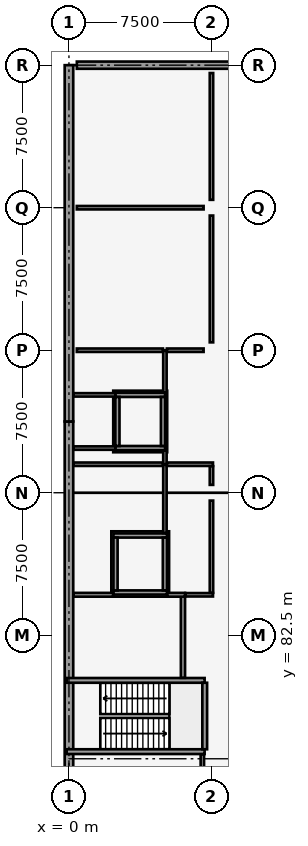
"""IFC4 building model, lengths in metres.
Left out: names, types, materials, properties, quantities, classifications, styles, units other than length and angle.
Written with IfcOpenShell. Run it as: python <this file> out.ifc"""

import sys

from ifc_helpers import new_model, si_unit, direction, frame, frame_2d, origin, origin_2d, place, context, subcontext, project, spatial, rectangle, extrude, element, fill, save


model = new_model("IFC4")
c1 = context("Model", 3, precision=1e-05, world=origin(), true_north=direction((0.0, 1.0)))
c2 = subcontext(c1, "Body", "Model", "MODEL_VIEW")
j1 = project(units=[si_unit("LENGTHUNIT", "METRE"), si_unit("PLANEANGLEUNIT", "RADIAN")], contexts=[c1])
p1 = place(None, origin())
s1 = spatial("IfcSite", under=j1, at=p1, CompositionType="ELEMENT")
p2 = place(p1, origin())
s2 = spatial("IfcBuilding", under=s1, at=p2, CompositionType="ELEMENT")
p3 = place(p2, frame((0.0, 0.0, -4.8)))
s3 = spatial("IfcBuildingStorey", under=s2, at=p3, CompositionType="ELEMENT", Elevation=-4.8)
for number, where, z_axis, x_axis in (
    (1, (0.0, 82.5, 0.0), (0.0, 0.0, 1.0), (1.0, 0.0, 0.0)),
    (2, (0.0, 90.0, 0.0), (0.0, 0.0, 1.0), (1.0, 0.0, 0.0)),
    (3, (0.0, 97.5, 0.0), (0.0, 0.0, 1.0), (1.0, 0.0, 0.0)),
    (4, (0.0, 105.0, 0.0), (0.0, 0.0, 1.0), (1.0, 0.0, 0.0)),
    (5, (0.0, 112.5, 0.0), (0.0, 0.0, 1.0), (1.0, 0.0, 0.0)),
    (6, (7.5, 82.5, 0.0), (0.0, 0.0, 1.0), (1.0, 0.0, 0.0)),
    (7, (7.5, 90.0, 0.0), (0.0, 0.0, 1.0), (1.0, 0.0, 0.0)),
    (8, (7.5, 97.5, 0.0), (0.0, 0.0, 1.0), (1.0, 0.0, 0.0)),
    (9, (7.5, 105.0, 0.0), (0.0, 0.0, 1.0), (1.0, 0.0, 0.0)),
    (10, (7.5, 112.5, 0.0), (0.0, 0.0, 1.0), (1.0, 0.0, 0.0)),
):
    element("IfcColumn", number, at=place(p3, frame(where, z_axis=z_axis, x_axis=x_axis)), inside=s3, PredefinedType="COLUMN", context=c2, shape_type="SweptSolid", body=[
        extrude(rectangle(XDim=0.8, YDim=0.8, at=origin_2d()), origin(), (0.0, 0.0, 1.0), 4.8),
    ])
p4 = place(p3, frame((0.0, 101.25, 0.0), z_axis=(0.0, 0.0, 1.0), x_axis=(1.0, 0.0, 0.0)))
e11 = element("IfcColumn", 11, at=p4, inside=s3, PredefinedType="PILASTER", context=c2, shape_type="SweptSolid", body=[
    extrude(rectangle(XDim=0.45, YDim=0.85, at=origin_2d()), origin(), (0.0, 0.0, 1.0), 4.8),
])
for number, where, z_axis, x_axis in (
    (12, (0.0, 75.0, 0.0), (0.0, 0.0, 1.0), (0.0, 1.0, 0.0)),
    (13, (0.0, 93.75, 0.0), (0.0, 0.0, 1.0), (0.0, 1.0, 0.0)),
):
    element("IfcWall", number, at=place(p3, frame(where, z_axis=z_axis, x_axis=x_axis)), inside=s3, PredefinedType="USERDEFINED", context=c2, shape_type="SweptSolid", body=[
        extrude(rectangle(XDim=18.75, YDim=0.45, at=frame_2d((9.375, 0.0))), origin(), (0.0, 0.0, 1.0), 4.5),
    ])
p5 = place(p3, frame((0.415, 112.5, 0.0), z_axis=(0.0, 0.0, 1.0), x_axis=(1.0, 0.0, 0.0)))
e14 = element("IfcWall", 14, at=p5, inside=s3, PredefinedType="USERDEFINED", context=c2, shape_type="SweptSolid", body=[
    extrude(rectangle(XDim=18.335, YDim=0.38, at=frame_2d((9.167, 0.0))), origin(), (0.0, 0.0, 1.0), 4.5),
])
p6 = place(p3, frame((-0.12, 76.375, 0.0), z_axis=(0.0, 0.0, 1.0), x_axis=(1.0, 0.0, 0.0)))
e15 = element("IfcWall", 15, at=p6, inside=s3, PredefinedType="SOLIDWALL", context=c2, shape_type="SweptSolid", body=[
    extrude(rectangle(XDim=7.26, YDim=0.25, at=frame_2d((3.63, 0.0))), origin(), (0.0, 0.0, 1.0), 4.5),
])
p7 = place(p3, frame((-0.12, 80.125, 0.0), z_axis=(0.0, 0.0, 1.0), x_axis=(1.0, 0.0, 0.0)))
e16 = element("IfcWall", 16, at=p7, inside=s3, PredefinedType="SOLIDWALL", context=c2, shape_type="SweptSolid", body=[
    extrude(rectangle(XDim=7.26, YDim=0.25, at=frame_2d((3.63, 0.0))), origin(), (0.0, 0.0, 1.0), 4.5),
])
p8 = place(p7, frame((0.45, 0.0, 0.0)))
e17 = element("IfcOpeningElement", 17, at=p8, cuts=e16, PredefinedType="OPENING", context=c2, shape_type="SweptSolid", body=[
    extrude(rectangle(XDim=1.1, YDim=2.15, at=frame_2d((0.55, 1.075))), frame((0.0, 0.135, 0.0), z_axis=(0.0, -1.0, 0.0), x_axis=(1.0, 0.0, 0.0)), (0.0, 0.0, 1.0), 0.27),
])
p9 = place(p3, frame((7.145, 76.5, 0.0), z_axis=(0.0, 0.0, 1.0), x_axis=(0.0, 1.0, 0.0)))
e18 = element("IfcWall", 18, at=p9, inside=s3, PredefinedType="SOLIDWALL", context=c2, shape_type="SweptSolid", body=[
    extrude(rectangle(XDim=3.5, YDim=0.25, at=frame_2d((1.75, 0.0))), origin(), (0.0, 0.0, 1.0), 4.5),
])
for number, where, z_axis, x_axis in (
    (19, (2.44, 92.35, 0.0), (0.0, 0.0, 1.0), (1.0, 0.0, 0.0)),
    (20, (2.44, 95.15, 0.0), (0.0, 0.0, 1.0), (1.0, 0.0, 0.0)),
):
    element("IfcWall", number, at=place(p3, frame(where, z_axis=z_axis, x_axis=x_axis)), inside=s3, PredefinedType="SOLIDWALL", context=c2, shape_type="SweptSolid", body=[
        extrude(rectangle(XDim=2.62, YDim=0.22, at=frame_2d((1.31, 0.0))), origin(), (0.0, 0.0, 1.0), 4.5),
    ])
p10 = place(p3, frame((2.55, 92.46, 0.0), z_axis=(0.0, 0.0, 1.0), x_axis=(0.0, 1.0, 0.0)))
e21 = element("IfcWall", 21, at=p10, inside=s3, PredefinedType="SOLIDWALL", context=c2, shape_type="SweptSolid", body=[
    extrude(rectangle(XDim=2.58, YDim=0.22, at=frame_2d((1.29, 0.0))), origin(), (0.0, 0.0, 1.0), 4.5),
])
p11 = place(p3, frame((4.95, 92.46, 0.0), z_axis=(0.0, 0.0, 1.0), x_axis=(0.0, 1.0, 0.0)))
e22 = element("IfcWall", 22, at=p11, inside=s3, PredefinedType="SOLIDWALL", context=c2, shape_type="SweptSolid", body=[
    extrude(rectangle(XDim=2.58, YDim=0.22, at=frame_2d((1.29, 0.0))), origin(), (0.0, 0.0, 1.0), 4.5),
])
p12 = place(p11, frame((0.79, 0.0, 0.0)))
e23 = element("IfcOpeningElement", 23, at=p12, cuts=e22, PredefinedType="OPENING", context=c2, shape_type="SweptSolid", body=[
    extrude(rectangle(XDim=1.0, YDim=2.15, at=frame_2d((0.5, 1.075))), frame((0.0, 0.12, 0.0), z_axis=(0.0, -1.0, 0.0), x_axis=(1.0, 0.0, 0.0)), (0.0, 0.0, 1.0), 0.24),
])
p13 = place(p3, frame((2.34, 84.75, 0.0), z_axis=(0.0, 0.0, 1.0), x_axis=(1.0, 0.0, 0.0)))
e24 = element("IfcWall", 24, at=p13, inside=s3, PredefinedType="SOLIDWALL", context=c2, shape_type="SweptSolid", body=[
    extrude(rectangle(XDim=2.82, YDim=0.22, at=frame_2d((1.41, 0.0))), origin(), (0.0, 0.0, 1.0), 4.5),
])
p14 = place(p13, frame((0.86, 0.0, 0.0)))
e25 = element("IfcOpeningElement", 25, at=p14, cuts=e24, PredefinedType="OPENING", context=c2, shape_type="SweptSolid", body=[
    extrude(rectangle(XDim=1.1, YDim=2.15, at=frame_2d((0.55, 1.075))), frame((0.0, 0.12, 0.0), z_axis=(0.0, -1.0, 0.0), x_axis=(1.0, 0.0, 0.0)), (0.0, 0.0, 1.0), 0.24),
])
p15 = place(p3, frame((2.34, 87.75, 0.0), z_axis=(0.0, 0.0, 1.0), x_axis=(1.0, 0.0, 0.0)))
e26 = element("IfcWall", 26, at=p15, inside=s3, PredefinedType="SOLIDWALL", context=c2, shape_type="SweptSolid", body=[
    extrude(rectangle(XDim=2.82, YDim=0.22, at=frame_2d((1.41, 0.0))), origin(), (0.0, 0.0, 1.0), 4.5),
])
for number, where, z_axis, x_axis in (
    (27, (2.45, 84.86, 0.0), (0.0, 0.0, 1.0), (0.0, 1.0, 0.0)),
    (28, (5.05, 84.86, 0.0), (0.0, 0.0, 1.0), (0.0, 1.0, 0.0)),
):
    element("IfcWall", number, at=place(p3, frame(where, z_axis=z_axis, x_axis=x_axis)), inside=s3, PredefinedType="SOLIDWALL", context=c2, shape_type="SweptSolid", body=[
        extrude(rectangle(XDim=2.78, YDim=0.22, at=frame_2d((1.39, 0.0))), origin(), (0.0, 0.0, 1.0), 4.5),
    ])
p16 = place(p3, frame((6.0, 80.26, 0.0), z_axis=(0.0, 0.0, 1.0), x_axis=(0.0, 1.0, 0.0)))
e29 = element("IfcWall", 29, at=p16, inside=s3, PredefinedType="SOLIDWALL", context=c2, shape_type="SweptSolid", body=[
    extrude(rectangle(XDim=4.37, YDim=0.22, at=frame_2d((2.185, 0.0))), origin(), (0.0, 0.0, 1.0), 4.5),
])
p17 = place(p16, frame((0.45, 0.0, 0.0)))
e30 = element("IfcOpeningElement", 30, at=p17, cuts=e29, PredefinedType="OPENING", context=c2, shape_type="SweptSolid", body=[
    extrude(rectangle(XDim=1.1, YDim=2.15, at=frame_2d((0.55, 1.075))), frame((0.0, 0.12, 0.0), z_axis=(0.0, -1.0, 0.0), x_axis=(1.0, 0.0, 0.0)), (0.0, 0.0, 1.0), 0.24),
])
p18 = place(p3, frame((0.24, 84.63, 0.0), z_axis=(0.0, 0.0, 1.0), x_axis=(1.0, 0.0, 0.0)))
e31 = element("IfcWall", 31, at=p18, inside=s3, PredefinedType="PARTITIONING", context=c2, shape_type="SweptSolid", body=[
    extrude(rectangle(XDim=2.085, YDim=0.2, at=frame_2d((1.042, 0.0))), origin(), (0.0, 0.0, 1.0), 4.48),
])
p19 = place(p3, frame((5.175, 84.63, 0.0), z_axis=(0.0, 0.0, 1.0), x_axis=(1.0, 0.0, 0.0)))
e32 = element("IfcWall", 32, at=p19, inside=s3, PredefinedType="PARTITIONING", context=c2, shape_type="SweptSolid", body=[
    extrude(rectangle(XDim=0.935, YDim=0.2, at=frame_2d((0.468, 0.0))), origin(), (0.0, 0.0, 1.0), 4.48),
])
p20 = place(p3, frame((7.02, 75.414, 0.0), z_axis=(0.0, 0.0, 1.0), x_axis=(0.0, 1.0, 0.0)))
e33 = element("IfcWall", 33, at=p20, inside=s3, PredefinedType="PARTITIONING", context=c2, shape_type="SweptSolid", body=[
    extrude(rectangle(XDim=0.822, YDim=0.18, at=frame_2d((0.411, 0.0))), origin(), (0.0, 0.0, 1.0), 3.82),
])
p21 = place(p3, frame((5.05, 87.874, 0.0), z_axis=(0.0, 0.0, 1.0), x_axis=(0.0, 1.0, 0.0)))
e34 = element("IfcWall", 34, at=p21, inside=s3, PredefinedType="PARTITIONING", context=c2, shape_type="SweptSolid", body=[
    extrude(rectangle(XDim=3.626, YDim=0.18, at=frame_2d((1.813, 0.0))), origin(), (0.0, 0.0, 1.0), 3.57),
])
p22 = place(p3, frame((6.124, 84.63, 0.0), z_axis=(0.0, 0.0, 1.0), x_axis=(1.0, 0.0, 0.0)))
e35 = element("IfcWall", 35, at=p22, inside=s3, PredefinedType="PARTITIONING", context=c2, shape_type="SweptSolid", body=[
    extrude(rectangle(XDim=1.456, YDim=0.18, at=frame_2d((0.728, 0.0))), origin(), (0.0, 0.0, 1.0), 3.87),
])
p23 = place(p3, frame((0.239, 91.5, 0.0), z_axis=(0.0, 0.0, 1.0), x_axis=(1.0, 0.0, 0.0)))
e36 = element("IfcWall", 36, at=p23, inside=s3, PredefinedType="PARTITIONING", context=c2, shape_type="SweptSolid", body=[
    extrude(rectangle(XDim=4.707, YDim=0.18, at=frame_2d((2.354, 0.0))), origin(), (0.0, 0.0, 1.0), 3.87),
])
p24 = place(p3, frame((5.154, 91.5, 0.0), z_axis=(0.0, 0.0, 1.0), x_axis=(1.0, 0.0, 0.0)))
e37 = element("IfcWall", 37, at=p24, inside=s3, PredefinedType="PARTITIONING", context=c2, shape_type="SweptSolid", body=[
    extrude(rectangle(XDim=2.426, YDim=0.18, at=frame_2d((1.213, 0.0))), origin(), (0.0, 0.0, 1.0), 3.77),
])
p25 = place(p3, frame((7.5, 84.734, 0.0), z_axis=(0.0, 0.0, 1.0), x_axis=(0.0, 1.0, 0.0)))
e38 = element("IfcWall", 38, at=p25, inside=s3, PredefinedType="PARTITIONING", context=c2, shape_type="SweptSolid", body=[
    extrude(rectangle(XDim=4.852, YDim=0.18, at=frame_2d((2.426, 0.0))), origin(), (0.0, 0.0, 1.0), 3.52),
])
p26 = place(p25, frame((2.241, 0.0, 0.0)))
e39 = element("IfcOpeningElement", 39, at=p26, cuts=e38, PredefinedType="OPENING", context=c2, shape_type="SweptSolid", body=[
    extrude(rectangle(XDim=1.05, YDim=2.12, at=frame_2d((0.525, 1.06))), frame((0.0, 0.1, 0.0), z_axis=(0.0, -1.0, 0.0), x_axis=(1.0, 0.0, 0.0)), (0.0, 0.0, 1.0), 0.2),
])
p27 = place(p3, frame((7.5, 90.414, 0.0), z_axis=(0.0, 0.0, 1.0), x_axis=(0.0, 1.0, 0.0)))
e40 = element("IfcWall", 40, at=p27, inside=s3, PredefinedType="PARTITIONING", context=c2, shape_type="SweptSolid", body=[
    extrude(rectangle(XDim=0.982, YDim=0.18, at=frame_2d((0.491, 0.0))), origin(), (0.0, 0.0, 1.0), 3.52),
])
for number, where, z_axis, x_axis in (
    (41, (0.239, 92.35, 0.0), (0.0, 0.0, 1.0), (1.0, 0.0, 0.0)),
    (42, (0.239, 95.15, 0.0), (0.0, 0.0, 1.0), (1.0, 0.0, 0.0)),
):
    element("IfcWall", number, at=place(p3, frame(where, z_axis=z_axis, x_axis=x_axis)), inside=s3, PredefinedType="PARTITIONING", context=c2, shape_type="SweptSolid", body=[
        extrude(rectangle(XDim=2.201, YDim=0.18, at=frame_2d((1.101, 0.0))), origin(), (0.0, 0.0, 1.0), 3.87),
    ])
p28 = place(p3, frame((5.05, 91.5, 0.0), z_axis=(0.0, 0.0, 1.0), x_axis=(0.0, 1.0, 0.0)))
e43 = element("IfcWall", 43, at=p28, inside=s3, PredefinedType="PARTITIONING", context=c2, shape_type="SweptSolid", body=[
    extrude(rectangle(XDim=0.726, YDim=0.18, at=frame_2d((0.363, 0.0))), origin(), (0.0, 0.0, 1.0), 3.87),
])
p29 = place(p3, frame((5.05, 95.274, 0.0), z_axis=(0.0, 0.0, 1.0), x_axis=(0.0, 1.0, 0.0)))
e44 = element("IfcWall", 44, at=p29, inside=s3, PredefinedType="PARTITIONING", context=c2, shape_type="SweptSolid", body=[
    extrude(rectangle(XDim=2.226, YDim=0.18, at=frame_2d((1.113, 0.0))), origin(), (0.0, 0.0, 1.0), 3.57),
])
p30 = place(p3, frame((0.414, 97.5, 0.0), z_axis=(0.0, 0.0, 1.0), x_axis=(1.0, 0.0, 0.0)))
e45 = element("IfcWall", 45, at=p30, inside=s3, PredefinedType="PARTITIONING", context=c2, shape_type="SweptSolid", body=[
    extrude(rectangle(XDim=4.532, YDim=0.18, at=frame_2d((2.266, 0.0))), origin(), (0.0, 0.0, 1.0), 3.57),
])
p31 = place(p3, frame((5.154, 97.5, 0.0), z_axis=(0.0, 0.0, 1.0), x_axis=(1.0, 0.0, 0.0)))
e46 = element("IfcWall", 46, at=p31, inside=s3, PredefinedType="PARTITIONING", context=c2, shape_type="SweptSolid", body=[
    extrude(rectangle(XDim=1.932, YDim=0.18, at=frame_2d((0.966, 0.0))), origin(), (0.0, 0.0, 1.0), 3.52),
])
p32 = place(p3, frame((0.414, 105.0, 0.0), z_axis=(0.0, 0.0, 1.0), x_axis=(1.0, 0.0, 0.0)))
e47 = element("IfcWall", 47, at=p32, inside=s3, PredefinedType="PARTITIONING", context=c2, shape_type="SweptSolid", body=[
    extrude(rectangle(XDim=6.672, YDim=0.18, at=frame_2d((3.336, 0.0))), origin(), (0.0, 0.0, 1.0), 3.52),
])
p33 = place(p3, frame((7.5, 97.914, 0.0), z_axis=(0.0, 0.0, 1.0), x_axis=(0.0, 1.0, 0.0)))
e48 = element("IfcWall", 48, at=p33, inside=s3, PredefinedType="PARTITIONING", context=c2, shape_type="SweptSolid", body=[
    extrude(rectangle(XDim=6.672, YDim=0.18, at=frame_2d((3.336, 0.0))), origin(), (0.0, 0.0, 1.0), 3.52),
])
p34 = place(p33, frame((2.836, 0.0, 0.0)))
e49 = element("IfcOpeningElement", 49, at=p34, cuts=e48, PredefinedType="OPENING", context=c2, shape_type="SweptSolid", body=[
    extrude(rectangle(XDim=1.0, YDim=2.12, at=frame_2d((0.5, 1.06))), frame((0.0, 0.1, 0.0), z_axis=(0.0, -1.0, 0.0), x_axis=(1.0, 0.0, 0.0)), (0.0, 0.0, 1.0), 0.2),
])
p35 = place(p3, frame((7.5, 105.414, 0.0), z_axis=(0.0, 0.0, 1.0), x_axis=(0.0, 1.0, 0.0)))
e50 = element("IfcWall", 50, at=p35, inside=s3, PredefinedType="PARTITIONING", context=c2, shape_type="SweptSolid", body=[
    extrude(rectangle(XDim=6.672, YDim=0.18, at=frame_2d((3.336, 0.0))), origin(), (0.0, 0.0, 1.0), 3.52),
])
p36 = place(p35, frame((2.836, 0.0, 0.0)))
e51 = element("IfcOpeningElement", 51, at=p36, cuts=e50, PredefinedType="OPENING", context=c2, shape_type="SweptSolid", body=[
    extrude(rectangle(XDim=1.0, YDim=2.12, at=frame_2d((0.5, 1.06))), frame((0.0, 0.1, 0.0), z_axis=(0.0, -1.0, 0.0), x_axis=(1.0, 0.0, 0.0)), (0.0, 0.0, 1.0), 0.2),
])
p37 = place(p8, origin())
e52 = element("IfcDoor", 52, at=p37, inside=s3, OperationType="SINGLE_SWING_LEFT", PredefinedType="DOOR", context=c2, shape_type="SweptSolid", body=[
    extrude(rectangle(XDim=1.1, YDim=2.15, at=frame_2d((0.55, 1.075))), frame((0.0, 0.025, 0.0), z_axis=(0.0, -1.0, 0.0), x_axis=(1.0, 0.0, 0.0)), (0.0, 0.0, 1.0), 0.05),
])
fill(e17, e52)
p38 = place(p12, origin())
e53 = element("IfcDoor", 53, at=p38, inside=s3, OperationType="SLIDING_TO_LEFT", PredefinedType="DOOR", context=c2, shape_type="SweptSolid", body=[
    extrude(rectangle(XDim=1.0, YDim=2.15, at=frame_2d((0.5, 1.075))), frame((0.0, 0.025, 0.0), z_axis=(0.0, -1.0, 0.0), x_axis=(1.0, 0.0, 0.0)), (0.0, 0.0, 1.0), 0.05),
])
fill(e23, e53)
p39 = place(p14, origin())
e54 = element("IfcDoor", 54, at=p39, inside=s3, OperationType="SLIDING_TO_LEFT", PredefinedType="DOOR", context=c2, shape_type="SweptSolid", body=[
    extrude(rectangle(XDim=1.1, YDim=2.15, at=frame_2d((0.55, 1.075))), frame((0.0, 0.025, 0.0), z_axis=(0.0, -1.0, 0.0), x_axis=(1.0, 0.0, 0.0)), (0.0, 0.0, 1.0), 0.05),
])
fill(e25, e54)
p40 = place(p17, origin())
e55 = element("IfcDoor", 55, at=p40, inside=s3, OperationType="SINGLE_SWING_RIGHT", PredefinedType="DOOR", context=c2, shape_type="SweptSolid", body=[
    extrude(rectangle(XDim=1.1, YDim=2.15, at=frame_2d((0.55, 1.075))), frame((0.0, 0.025, 0.0), z_axis=(0.0, -1.0, 0.0), x_axis=(1.0, 0.0, 0.0)), (0.0, 0.0, 1.0), 0.05),
])
fill(e30, e55)
p41 = place(p26, origin())
e56 = element("IfcDoor", 56, at=p41, inside=s3, OperationType="SINGLE_SWING_RIGHT", PredefinedType="DOOR", context=c2, shape_type="SweptSolid", body=[
    extrude(rectangle(XDim=1.05, YDim=2.12, at=frame_2d((0.525, 1.06))), frame((0.0, 0.025, 0.0), z_axis=(0.0, -1.0, 0.0), x_axis=(1.0, 0.0, 0.0)), (0.0, 0.0, 1.0), 0.05),
])
fill(e39, e56)
p42 = place(p34, origin())
e57 = element("IfcDoor", 57, at=p42, inside=s3, OperationType="SINGLE_SWING_LEFT", PredefinedType="DOOR", context=c2, shape_type="SweptSolid", body=[
    extrude(rectangle(XDim=1.0, YDim=2.12, at=frame_2d((0.5, 1.06))), frame((0.0, 0.025, 0.0), z_axis=(0.0, -1.0, 0.0), x_axis=(1.0, 0.0, 0.0)), (0.0, 0.0, 1.0), 0.05),
])
fill(e49, e57)
p43 = place(p36, origin())
e58 = element("IfcDoor", 58, at=p43, inside=s3, OperationType="SINGLE_SWING_RIGHT", PredefinedType="DOOR", context=c2, shape_type="SweptSolid", body=[
    extrude(rectangle(XDim=1.0, YDim=2.12, at=frame_2d((0.5, 1.06))), frame((0.0, 0.025, 0.0), z_axis=(0.0, -1.0, 0.0), x_axis=(1.0, 0.0, 0.0)), (0.0, 0.0, 1.0), 0.05),
])
fill(e51, e58)
save(model, sys.argv[1])
